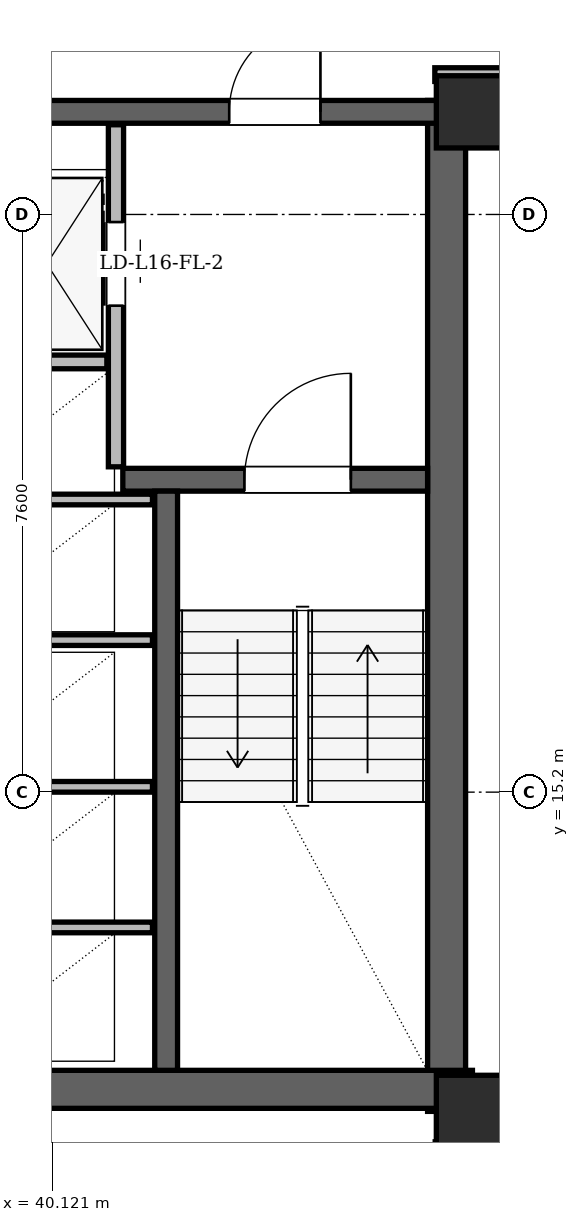
"""IFC4 building model, lengths in metres.
Left out: names, types, materials, properties, quantities, classifications, styles, units other than length and angle.
Written with IfcOpenShell. Run it as: python <this file> out.ifc"""

import sys

from ifc_helpers import new_model, si_unit, direction, frame, frame_2d, origin, origin_2d, place, context, subcontext, project, spatial, rectangle, hollow_rectangle, extrude, element, fill, save


model = new_model("IFC4")
c1 = context("Model", 3, precision=1e-05, world=origin(), true_north=direction((0.0, 1.0)))
c2 = subcontext(c1, "Body", "Model", "MODEL_VIEW")
j1 = project(units=[si_unit("LENGTHUNIT", "METRE"), si_unit("PLANEANGLEUNIT", "RADIAN")], contexts=[c1])
p1 = place(None, origin())
s1 = spatial("IfcSite", under=j1, at=p1, CompositionType="ELEMENT")
p2 = place(p1, origin())
s2 = spatial("IfcBuilding", under=s1, at=p2, CompositionType="ELEMENT")
p3 = place(p2, frame((0.0, 0.0, 63.3)))
s3 = spatial("IfcBuildingStorey", under=s2, at=p3, CompositionType="ELEMENT", Elevation=63.3)
for number, where, z_axis, x_axis in (
    (1, (45.65, 11.0, 0.0), (0.0, 0.0, 1.0), (1.0, 0.0, 0.0)),
    (2, (45.65, 24.15, 0.0), (0.0, 0.0, 1.0), (1.0, 0.0, 0.0)),
):
    element("IfcColumn", number, at=place(p3, frame(where, z_axis=z_axis, x_axis=x_axis)), inside=s3, PredefinedType="COLUMN", context=c2, shape_type="SweptSolid", body=[
        extrude(hollow_rectangle(XDim=0.95, YDim=0.95, WallThickness=0.08, at=origin_2d()), origin(), (0.0, 0.0, 1.0), 3.6),
    ])
p4 = place(p3, frame((45.31, 11.0, 0.0), z_axis=(0.0, 0.0, 1.0), x_axis=(0.0, 1.0, 0.0)))
e3 = element("IfcWall", 3, at=p4, inside=s3, PredefinedType="SHEAR", context=c2, shape_type="SweptSolid", body=[
    extrude(rectangle(XDim=13.3, YDim=0.5, at=frame_2d((6.65, 0.0))), origin(), (0.0, 0.0, 1.0), 3.36),
])
p5 = place(p3, frame((38.55, 11.29, 0.0), z_axis=(0.0, 0.0, 1.0), x_axis=(1.0, 0.0, 0.0)))
e4 = element("IfcWall", 4, at=p5, inside=s3, PredefinedType="SHEAR", context=c2, shape_type="SweptSolid", body=[
    extrude(rectangle(XDim=7.1, YDim=0.5, at=frame_2d((3.55, 0.0))), origin(), (0.0, 0.0, 1.0), 3.36),
])
p6 = place(p3, frame((29.65, 24.15, 0.0), z_axis=(0.0, 0.0, 1.0), x_axis=(1.0, 0.0, 0.0)))
e5 = element("IfcWall", 5, at=p6, inside=s3, PredefinedType="SHEAR", context=c2, shape_type="SweptSolid", body=[
    extrude(rectangle(XDim=15.7, YDim=0.3, at=frame_2d((7.85, 0.0))), origin(), (0.0, 0.0, 1.0), 3.36),
])
p7 = place(p6, frame((1.7, 0.0, 0.0)))
e6 = element("IfcOpeningElement", 6, at=p7, cuts=e5, PredefinedType="OPENING", context=c2, shape_type="SweptSolid", body=[
    extrude(rectangle(XDim=1.2, YDim=2.2, at=frame_2d((0.6, 1.1))), frame((0.0, 0.15, 0.0), z_axis=(0.0, -1.0, 0.0), x_axis=(1.0, 0.0, 0.0)), (0.0, 0.0, 1.0), 0.3),
])
p8 = place(p6, frame((12.8, 0.0, 0.0)))
e7 = element("IfcOpeningElement", 7, at=p8, cuts=e5, PredefinedType="OPENING", context=c2, shape_type="SweptSolid", body=[
    extrude(rectangle(XDim=1.2, YDim=2.2, at=frame_2d((0.6, 1.1))), frame((0.0, 0.15, 0.0), z_axis=(0.0, -1.0, 0.0), x_axis=(1.0, 0.0, 0.0)), (0.0, 0.0, 1.0), 0.3),
])
p9 = place(p6, frame((6.55, 0.0, 0.0)))
e8 = element("IfcOpeningElement", 8, at=p9, cuts=e5, PredefinedType="OPENING", context=c2, shape_type="SweptSolid", body=[
    extrude(rectangle(XDim=0.9, YDim=2.05, at=frame_2d((0.45, 1.025))), frame((0.0, 0.15, 0.0), z_axis=(0.0, -1.0, 0.0), x_axis=(1.0, 0.0, 0.0)), (0.0, 0.0, 1.0), 0.3),
])
p10 = place(p6, frame((8.45, 0.0, 0.0)))
e9 = element("IfcOpeningElement", 9, at=p10, cuts=e5, PredefinedType="OPENING", context=c2, shape_type="SweptSolid", body=[
    extrude(rectangle(XDim=0.9, YDim=2.05, at=frame_2d((0.45, 1.025))), frame((0.0, 0.15, 0.0), z_axis=(0.0, -1.0, 0.0), x_axis=(1.0, 0.0, 0.0)), (0.0, 0.0, 1.0), 0.3),
])
p11 = place(p3, frame((41.05, 19.31, 0.0), z_axis=(0.0, 0.0, 1.0), x_axis=(1.0, 0.0, 0.0)))
e10 = element("IfcWall", 10, at=p11, inside=s3, PredefinedType="SHEAR", context=c2, shape_type="SweptSolid", body=[
    extrude(rectangle(XDim=4.01, YDim=0.3, at=frame_2d((2.005, 0.0))), origin(), (0.0, 0.0, 1.0), 3.36),
])
p12 = place(p11, frame((1.6, 0.0, 0.0)))
e11 = element("IfcOpeningElement", 11, at=p12, cuts=e10, PredefinedType="OPENING", context=c2, shape_type="SweptSolid", body=[
    extrude(rectangle(XDim=1.4, YDim=2.2, at=frame_2d((0.7, 1.1))), frame((0.0, 0.15, 0.0), z_axis=(0.0, -1.0, 0.0), x_axis=(1.0, 0.0, 0.0)), (0.0, 0.0, 1.0), 0.3),
])
p13 = place(p3, frame((41.62, 11.54, 0.0), z_axis=(0.0, 0.0, 1.0), x_axis=(0.0, 1.0, 0.0)))
e12 = element("IfcWall", 12, at=p13, inside=s3, PredefinedType="SHEAR", context=c2, shape_type="SweptSolid", body=[
    extrude(rectangle(XDim=7.62, YDim=0.3, at=frame_2d((3.81, 0.0))), origin(), (0.0, 0.0, 1.0), 3.36),
])
p14 = place(p3, frame((61.273, 14.383, 0.0), z_axis=(0.0, 0.0, 1.0), x_axis=(-0.500001933811, 0.866024287295, 0.0)))
e13 = element("IfcWall", 13, at=p14, inside=s3, PredefinedType="SOLIDWALL", context=c2, shape_type="SweptSolid", body=[
    extrude(rectangle(XDim=33.675, YDim=0.34, at=frame_2d((16.837, 0.0))), origin(), (0.0, 0.0, 1.0), 2.494),
])
p15 = place(p14, frame((7.615, 0.0, 0.0)))
e14 = element("IfcOpeningElement", 14, at=p15, cuts=e13, PredefinedType="OPENING", context=c2, shape_type="SweptSolid", body=[
    extrude(rectangle(XDim=1.5, YDim=2.2, at=frame_2d((0.75, 1.1))), frame((0.0, 0.17, 0.0), z_axis=(0.0, -1.0, 0.0), x_axis=(1.0, 0.0, 0.0)), (0.0, 0.0, 1.0), 0.34),
])
p16 = place(p14, frame((25.805, 0.0, 0.0)))
e15 = element("IfcOpeningElement", 15, at=p16, cuts=e13, PredefinedType="OPENING", context=c2, shape_type="SweptSolid", body=[
    extrude(rectangle(XDim=1.5, YDim=2.2, at=frame_2d((0.75, 1.1))), frame((0.0, 0.17, 0.0), z_axis=(0.0, -1.0, 0.0), x_axis=(1.0, 0.0, 0.0)), (0.0, 0.0, 1.0), 0.34),
])
p17 = place(p14, frame((1.57, 0.0, 0.85)))
e16 = element("IfcOpeningElement", 16, at=p17, cuts=e13, PredefinedType="OPENING", context=c2, shape_type="SweptSolid", body=[
    extrude(rectangle(XDim=1.4, YDim=1.534, at=frame_2d((0.7, 0.767))), frame((0.0, 0.17, 0.0), z_axis=(0.0, -1.0, 0.0), x_axis=(1.0, 0.0, 0.0)), (0.0, 0.0, 1.0), 0.34),
])
p18 = place(p14, frame((20.436, 0.0, 0.85)))
e17 = element("IfcOpeningElement", 17, at=p18, cuts=e13, PredefinedType="OPENING", context=c2, shape_type="SweptSolid", body=[
    extrude(rectangle(XDim=1.2, YDim=1.48, at=frame_2d((0.6, 0.74))), frame((0.0, 0.17, 0.0), z_axis=(0.0, -1.0, 0.0), x_axis=(1.0, 0.0, 0.0)), (0.0, 0.0, 1.0), 0.34),
])
p19 = place(p14, frame((29.61, 0.0, 0.85)))
e18 = element("IfcOpeningElement", 18, at=p19, cuts=e13, PredefinedType="OPENING", context=c2, shape_type="SweptSolid", body=[
    extrude(rectangle(XDim=2.2, YDim=1.534, at=frame_2d((1.1, 0.767))), frame((0.0, 0.17, 0.0), z_axis=(0.0, -1.0, 0.0), x_axis=(1.0, 0.0, 0.0)), (0.0, 0.0, 1.0), 0.34),
])
p20 = place(p14, frame((15.013, 0.0, 0.85)))
e19 = element("IfcOpeningElement", 19, at=p20, cuts=e13, PredefinedType="OPENING", context=c2, shape_type="SweptSolid", body=[
    extrude(rectangle(XDim=1.2, YDim=1.48, at=frame_2d((0.6, 0.74))), frame((0.0, 0.17, 0.0), z_axis=(0.0, -1.0, 0.0), x_axis=(1.0, 0.0, 0.0)), (0.0, 0.0, 1.0), 0.34),
])
p21 = place(p14, frame((17.765, 0.0, 0.85)))
e20 = element("IfcOpeningElement", 20, at=p21, cuts=e13, PredefinedType="OPENING", context=c2, shape_type="SweptSolid", body=[
    extrude(rectangle(XDim=1.2, YDim=1.48, at=frame_2d((0.6, 0.74))), frame((0.0, 0.17, 0.0), z_axis=(0.0, -1.0, 0.0), x_axis=(1.0, 0.0, 0.0)), (0.0, 0.0, 1.0), 0.34),
])
p22 = place(p3, frame((40.96, 19.48, 0.0), z_axis=(0.0, 0.0, 1.0), x_axis=(0.0, 1.0, 0.0)))
e21 = element("IfcWall", 21, at=p22, inside=s3, PredefinedType="PARTITIONING", context=c2, shape_type="SweptSolid", body=[
    extrude(rectangle(XDim=4.5, YDim=0.2, at=frame_2d((2.25, 0.0))), origin(), (0.0, 0.0, 1.0), 2.4),
])
p23 = place(p22, frame((2.12, 0.0, 0.0)))
e22 = element("IfcOpeningElement", 22, at=p23, cuts=e21, PredefinedType="OPENING", context=c2, shape_type="SweptSolid", body=[
    extrude(rectangle(XDim=1.1, YDim=2.2, at=frame_2d((0.55, 1.1))), frame((0.0, 0.1, 0.0), z_axis=(0.0, -1.0, 0.0), x_axis=(1.0, 0.0, 0.0)), (0.0, 0.0, 1.0), 0.2),
])
p24 = place(p3, frame((39.26, 20.86, 0.0), z_axis=(0.0, 0.0, 1.0), x_axis=(1.0, 0.0, 0.0)))
e23 = element("IfcWall", 23, at=p24, inside=s3, PredefinedType="PARTITIONING", context=c2, shape_type="SweptSolid", body=[
    extrude(rectangle(XDim=1.58, YDim=0.18, at=frame_2d((0.79, 0.0))), origin(), (0.0, 0.0, 1.0), 3.36),
])
for number, where, z_axis, x_axis in (
    (24, (38.78, 13.42, 0.0), (0.0, 0.0, 1.0), (1.0, 0.0, 0.0)),
    (25, (38.78, 15.27, 0.0), (0.0, 0.0, 1.0), (1.0, 0.0, 0.0)),
    (26, (38.78, 17.2, 0.0), (0.0, 0.0, 1.0), (1.0, 0.0, 0.0)),
    (27, (38.78, 19.05, 0.0), (0.0, 0.0, 1.0), (1.0, 0.0, 0.0)),
):
    element("IfcWall", number, at=place(p3, frame(where, z_axis=z_axis, x_axis=x_axis)), inside=s3, PredefinedType="PARTITIONING", context=c2, shape_type="SweptSolid", body=[
        extrude(rectangle(XDim=2.66, YDim=0.14, at=frame_2d((1.33, 0.0))), origin(), (0.0, 0.0, 1.0), 3.36),
    ])
p25 = place(p3, frame((45.155, 24.64, 0.0), z_axis=(0.0, 0.0, 1.0), x_axis=(1.0, 0.0, 0.0)))
e28 = element("IfcWall", 28, at=p25, inside=s3, PredefinedType="PARTITIONING", context=c2, shape_type="SweptSolid", body=[
    extrude(rectangle(XDim=0.99, YDim=0.18, at=frame_2d((0.495, 0.0))), origin(), (0.0, 0.0, 1.0), 2.738),
])
p26 = place(p23, origin())
e29 = element("IfcDoor", 29, at=p26, inside=s3, OperationType="SLIDING_TO_RIGHT", PredefinedType="DOOR", context=c2, shape_type="SweptSolid", body=[
    extrude(rectangle(XDim=1.1, YDim=2.2, at=frame_2d((0.55, 1.1))), frame((0.0, 0.025, 0.0), z_axis=(0.0, -1.0, 0.0), x_axis=(1.0, 0.0, 0.0)), (0.0, 0.0, 1.0), 0.05),
])
fill(e22, e29)
p27 = place(p12, origin())
e30 = element("IfcDoor", 30, at=p27, inside=s3, OperationType="SINGLE_SWING_RIGHT", PredefinedType="DOOR", context=c2, shape_type="SweptSolid", body=[
    extrude(rectangle(XDim=1.4, YDim=2.2, at=frame_2d((0.7, 1.1))), frame((0.0, 0.025, 0.0), z_axis=(0.0, -1.0, 0.0), x_axis=(1.0, 0.0, 0.0)), (0.0, 0.0, 1.0), 0.05),
])
fill(e11, e30)
p28 = place(p8, origin())
e31 = element("IfcDoor", 31, at=p28, inside=s3, OperationType="SINGLE_SWING_RIGHT", PredefinedType="DOOR", context=c2, shape_type="SweptSolid", body=[
    extrude(rectangle(XDim=1.2, YDim=2.2, at=frame_2d((0.6, 1.1))), frame((0.0, 0.025, 0.0), z_axis=(0.0, -1.0, 0.0), x_axis=(1.0, 0.0, 0.0)), (0.0, 0.0, 1.0), 0.05),
])
fill(e7, e31)
save(model, sys.argv[1])
